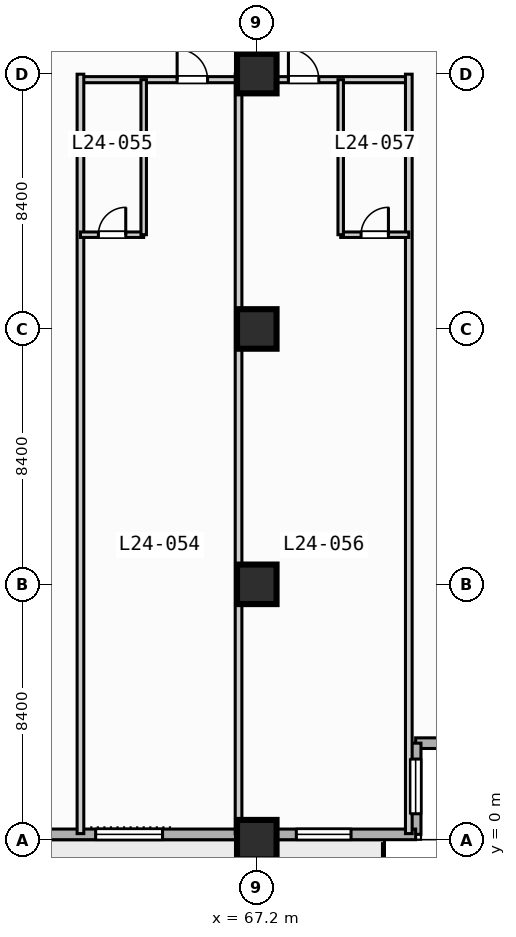
"""IFC4 building model, lengths in metres.
Left out: names, types, materials, properties, quantities, classifications, styles, units other than length and angle.
Written with IfcOpenShell. Run it as: python <this file> out.ifc"""

import sys

from ifc_helpers import new_model, si_unit, direction, frame, frame_2d, origin, origin_2d, place, context, subcontext, project, spatial, rectangle, extrude, element, fill, save


model = new_model("IFC4")
c1 = context("Model", 3, precision=1e-05, world=origin(), true_north=direction((0.0, 1.0)))
c2 = subcontext(c1, "Body", "Model", "MODEL_VIEW")
j1 = project(units=[si_unit("LENGTHUNIT", "METRE"), si_unit("PLANEANGLEUNIT", "RADIAN")], contexts=[c1])
p1 = place(None, origin())
s1 = spatial("IfcSite", under=j1, at=p1, CompositionType="ELEMENT")
p2 = place(p1, origin())
s2 = spatial("IfcBuilding", under=s1, at=p2, CompositionType="ELEMENT")
p3 = place(p2, frame((0.0, 0.0, 103.8)))
s3 = spatial("IfcBuildingStorey", under=s2, at=p3, CompositionType="ELEMENT", Elevation=103.8)
for number, where, z_axis, x_axis in (
    (1, (67.2, 0.0, 0.0), (0.0, 0.0, 1.0), (1.0, 0.0, 0.0)),
    (2, (67.2, 8.4, 0.0), (0.0, 0.0, 1.0), (1.0, 0.0, 0.0)),
    (3, (67.2, 16.8, 0.0), (0.0, 0.0, 1.0), (1.0, 0.0, 0.0)),
    (4, (67.2, 25.2, 0.0), (0.0, 0.0, 1.0), (1.0, 0.0, 0.0)),
):
    element("IfcColumn", number, at=place(p3, frame(where, z_axis=z_axis, x_axis=x_axis)), inside=s3, PredefinedType="COLUMN", context=c2, shape_type="SweptSolid", body=[
        extrude(rectangle(XDim=1.3, YDim=1.3, at=origin_2d()), origin(), (0.0, 0.0, 1.0), 3.8),
    ])
p4 = place(p3, frame((75.425, 3.175, 0.0), z_axis=(0.0, 0.0, 1.0), x_axis=(-1.0, 0.0, 0.0)))
e5 = element("IfcWall", 5, at=p4, inside=s3, PredefinedType="STANDARD", context=c2, shape_type="SweptSolid", body=[
    extrude(rectangle(XDim=3.0, YDim=0.35, at=frame_2d((1.5, 0.0))), origin(), (0.0, 0.0, 1.0), 3.55),
])
p5 = place(p3, frame((72.425, 3.175, 0.0), z_axis=(0.0, 0.0, 1.0), x_axis=(0.0, -1.0, 0.0)))
e6 = element("IfcWall", 6, at=p5, inside=s3, PredefinedType="STANDARD", context=c2, shape_type="SweptSolid", body=[
    extrude(rectangle(XDim=3.0, YDim=0.35, at=frame_2d((1.5, 0.0))), origin(), (0.0, 0.0, 1.0), 3.55),
])
p6 = place(p5, frame((0.522, 0.0, 0.85)))
e7 = element("IfcOpeningElement", 7, at=p6, cuts=e6, PredefinedType="OPENING", context=c2, shape_type="SweptSolid", body=[
    extrude(rectangle(XDim=1.8, YDim=1.8, at=frame_2d((0.9, 0.9))), frame((0.0, 0.185, 0.0), z_axis=(0.0, -1.0, 0.0), x_axis=(1.0, 0.0, 0.0)), (0.0, 0.0, 1.0), 0.37),
])
p7 = place(p3, frame((72.425, 0.175, 0.0), z_axis=(0.0, 0.0, 1.0), x_axis=(-1.0, 0.0, 0.0)))
e8 = element("IfcWall", 8, at=p7, inside=s3, PredefinedType="STANDARD", context=c2, shape_type="SweptSolid", body=[
    extrude(rectangle(XDim=69.25, YDim=0.35, at=frame_2d((34.625, 0.0))), origin(), (0.0, 0.0, 1.0), 3.55),
])
p8 = place(p7, frame((50.225, 0.0, 0.0)))
e9 = element("IfcOpeningElement", 9, at=p8, cuts=e8, PredefinedType="OPENING", context=c2, shape_type="SweptSolid", body=[
    extrude(rectangle(XDim=1.4, YDim=2.2, at=frame_2d((0.7, 1.1))), frame((0.0, 0.185, 0.0), z_axis=(0.0, -1.0, 0.0), x_axis=(1.0, 0.0, 0.0)), (0.0, 0.0, 1.0), 0.37),
])
p9 = place(p7, frame((33.525, 0.0, 0.85)))
e10 = element("IfcOpeningElement", 10, at=p9, cuts=e8, PredefinedType="OPENING", context=c2, shape_type="SweptSolid", body=[
    extrude(rectangle(XDim=2.2, YDim=1.8, at=frame_2d((1.1, 0.9))), frame((0.0, 0.185, 0.0), z_axis=(0.0, -1.0, 0.0), x_axis=(1.0, 0.0, 0.0)), (0.0, 0.0, 1.0), 0.37),
])
p10 = place(p7, frame((25.125, 0.0, 0.85)))
e11 = element("IfcOpeningElement", 11, at=p10, cuts=e8, PredefinedType="OPENING", context=c2, shape_type="SweptSolid", body=[
    extrude(rectangle(XDim=2.2, YDim=1.8, at=frame_2d((1.1, 0.9))), frame((0.0, 0.185, 0.0), z_axis=(0.0, -1.0, 0.0), x_axis=(1.0, 0.0, 0.0)), (0.0, 0.0, 1.0), 0.37),
])
p11 = place(p7, frame((8.325, 0.0, 0.85)))
e12 = element("IfcOpeningElement", 12, at=p11, cuts=e8, PredefinedType="OPENING", context=c2, shape_type="SweptSolid", body=[
    extrude(rectangle(XDim=2.2, YDim=1.8, at=frame_2d((1.1, 0.9))), frame((0.0, 0.185, 0.0), z_axis=(0.0, -1.0, 0.0), x_axis=(1.0, 0.0, 0.0)), (0.0, 0.0, 1.0), 0.37),
])
p12 = place(p7, frame((64.925, 0.0, 0.85)))
e13 = element("IfcOpeningElement", 13, at=p12, cuts=e8, PredefinedType="OPENING", context=c2, shape_type="SweptSolid", body=[
    extrude(rectangle(XDim=1.8, YDim=1.8, at=frame_2d((0.9, 0.9))), frame((0.0, 0.185, 0.0), z_axis=(0.0, -1.0, 0.0), x_axis=(1.0, 0.0, 0.0)), (0.0, 0.0, 1.0), 0.37),
])
p13 = place(p7, frame((56.525, 0.0, 0.85)))
e14 = element("IfcOpeningElement", 14, at=p13, cuts=e8, PredefinedType="OPENING", context=c2, shape_type="SweptSolid", body=[
    extrude(rectangle(XDim=1.8, YDim=1.8, at=frame_2d((0.9, 0.9))), frame((0.0, 0.185, 0.0), z_axis=(0.0, -1.0, 0.0), x_axis=(1.0, 0.0, 0.0)), (0.0, 0.0, 1.0), 0.37),
])
p14 = place(p7, frame((2.125, 0.0, 0.85)))
e15 = element("IfcOpeningElement", 15, at=p14, cuts=e8, PredefinedType="OPENING", context=c2, shape_type="SweptSolid", body=[
    extrude(rectangle(XDim=1.8, YDim=1.8, at=frame_2d((0.9, 0.9))), frame((0.0, 0.185, 0.0), z_axis=(0.0, -1.0, 0.0), x_axis=(1.0, 0.0, 0.0)), (0.0, 0.0, 1.0), 0.37),
])
p15 = place(p3, frame((61.4, 25.0, 0.0), z_axis=(0.0, 0.0, 1.0), x_axis=(1.0, 0.0, 0.0)))
e16 = element("IfcWall", 16, at=p15, inside=s3, PredefinedType="PARTITIONING", context=c2, shape_type="SweptSolid", body=[
    extrude(rectangle(XDim=10.8, YDim=0.2, at=frame_2d((5.4, 0.0))), origin(), (0.0, 0.0, 1.0), 2.8),
])
p16 = place(p15, frame((3.18, 0.0, 0.0)))
e17 = element("IfcOpeningElement", 17, at=p16, cuts=e16, PredefinedType="OPENING", context=c2, shape_type="SweptSolid", body=[
    extrude(rectangle(XDim=1.0, YDim=2.15, at=frame_2d((0.5, 1.075))), frame((0.0, 0.11, 0.0), z_axis=(0.0, -1.0, 0.0), x_axis=(1.0, 0.0, 0.0)), (0.0, 0.0, 1.0), 0.22),
])
p17 = place(p15, frame((6.84, 0.0, 0.0)))
e18 = element("IfcOpeningElement", 18, at=p17, cuts=e16, PredefinedType="OPENING", context=c2, shape_type="SweptSolid", body=[
    extrude(rectangle(XDim=1.0, YDim=2.15, at=frame_2d((0.5, 1.075))), frame((0.0, 0.11, 0.0), z_axis=(0.0, -1.0, 0.0), x_axis=(1.0, 0.0, 0.0)), (0.0, 0.0, 1.0), 0.22),
])
p18 = place(p3, frame((61.4, 0.2, 0.0), z_axis=(0.0, 0.0, 1.0), x_axis=(0.0, 1.0, 0.0)))
e19 = element("IfcWall", 19, at=p18, inside=s3, PredefinedType="PARTITIONING", context=c2, shape_type="SweptSolid", body=[
    extrude(rectangle(XDim=24.98, YDim=0.22, at=frame_2d((12.49, 0.0))), origin(), (0.0, 0.0, 1.0), 3.55),
])
p19 = place(p3, frame((61.4, 19.9, 0.0), z_axis=(0.0, 0.0, 1.0), x_axis=(1.0, 0.0, 0.0)))
e20 = element("IfcWall", 20, at=p19, inside=s3, PredefinedType="PLUMBINGWALL", context=c2, shape_type="SweptSolid", body=[
    extrude(rectangle(XDim=2.08, YDim=0.18, at=frame_2d((1.04, 0.0))), origin(), (0.0, 0.0, 1.0), 3.55),
])
p20 = place(p19, frame((0.59, 0.0, 0.0)))
e21 = element("IfcOpeningElement", 21, at=p20, cuts=e20, PredefinedType="OPENING", context=c2, shape_type="SweptSolid", body=[
    extrude(rectangle(XDim=0.9, YDim=2.1, at=frame_2d((0.45, 1.05))), frame((0.0, 0.1, 0.0), z_axis=(0.0, -1.0, 0.0), x_axis=(1.0, 0.0, 0.0)), (0.0, 0.0, 1.0), 0.2),
])
p21 = place(p3, frame((63.48, 19.9, 0.0), z_axis=(0.0, 0.0, 1.0), x_axis=(0.0, 1.0, 0.0)))
e22 = element("IfcWall", 22, at=p21, inside=s3, PredefinedType="PLUMBINGWALL", context=c2, shape_type="SweptSolid", body=[
    extrude(rectangle(XDim=5.1, YDim=0.18, at=frame_2d((2.55, 0.0))), origin(), (0.0, 0.0, 1.0), 3.55),
])
for number, where, z_axis, x_axis in (
    (23, (66.6, 0.2, 0.0), (0.0, 0.0, 1.0), (0.0, 1.0, 0.0)),
    (24, (72.2, 0.2, 0.0), (0.0, 0.0, 1.0), (0.0, 1.0, 0.0)),
):
    element("IfcWall", number, at=place(p3, frame(where, z_axis=z_axis, x_axis=x_axis)), inside=s3, PredefinedType="PARTITIONING", context=c2, shape_type="SweptSolid", body=[
        extrude(rectangle(XDim=24.98, YDim=0.22, at=frame_2d((12.49, 0.0))), origin(), (0.0, 0.0, 1.0), 3.55),
    ])
p22 = place(p3, frame((69.96, 19.9, 0.0), z_axis=(0.0, 0.0, 1.0), x_axis=(1.0, 0.0, 0.0)))
e25 = element("IfcWall", 25, at=p22, inside=s3, PredefinedType="PLUMBINGWALL", context=c2, shape_type="SweptSolid", body=[
    extrude(rectangle(XDim=2.24, YDim=0.18, at=frame_2d((1.12, 0.0))), origin(), (0.0, 0.0, 1.0), 3.55),
])
p23 = place(p22, frame((0.67, 0.0, 0.0)))
e26 = element("IfcOpeningElement", 26, at=p23, cuts=e25, PredefinedType="OPENING", context=c2, shape_type="SweptSolid", body=[
    extrude(rectangle(XDim=0.9, YDim=2.1, at=frame_2d((0.45, 1.05))), frame((0.0, 0.1, 0.0), z_axis=(0.0, -1.0, 0.0), x_axis=(1.0, 0.0, 0.0)), (0.0, 0.0, 1.0), 0.2),
])
p24 = place(p3, frame((69.96, 19.9, 0.0), z_axis=(0.0, 0.0, 1.0), x_axis=(0.0, 1.0, 0.0)))
e27 = element("IfcWall", 27, at=p24, inside=s3, PredefinedType="PLUMBINGWALL", context=c2, shape_type="SweptSolid", body=[
    extrude(rectangle(XDim=5.1, YDim=0.18, at=frame_2d((2.55, 0.0))), origin(), (0.0, 0.0, 1.0), 3.55),
])
p25 = place(p6, origin())
e28 = element("IfcWindow", 28, at=p25, inside=s3, PartitioningType="SINGLE_PANEL", PredefinedType="WINDOW", context=c2, shape_type="SweptSolid", body=[
    extrude(rectangle(XDim=1.8, YDim=1.8, at=frame_2d((0.9, 0.9))), frame((0.0, 0.03, 0.0), z_axis=(0.0, -1.0, 0.0), x_axis=(1.0, 0.0, 0.0)), (0.0, 0.0, 1.0), 0.06),
])
fill(e7, e28)
p26 = place(p11, origin())
e29 = element("IfcWindow", 29, at=p26, inside=s3, PartitioningType="SINGLE_PANEL", PredefinedType="WINDOW", context=c2, shape_type="SweptSolid", body=[
    extrude(rectangle(XDim=2.2, YDim=1.8, at=frame_2d((1.1, 0.9))), frame((0.0, 0.03, 0.0), z_axis=(0.0, -1.0, 0.0), x_axis=(1.0, 0.0, 0.0)), (0.0, 0.0, 1.0), 0.06),
])
fill(e12, e29)
p27 = place(p14, origin())
e30 = element("IfcWindow", 30, at=p27, inside=s3, PartitioningType="SINGLE_PANEL", PredefinedType="WINDOW", context=c2, shape_type="SweptSolid", body=[
    extrude(rectangle(XDim=1.8, YDim=1.8, at=frame_2d((0.9, 0.9))), frame((0.0, 0.03, 0.0), z_axis=(0.0, -1.0, 0.0), x_axis=(1.0, 0.0, 0.0)), (0.0, 0.0, 1.0), 0.06),
])
fill(e15, e30)
p28 = place(p16, origin())
e31 = element("IfcDoor", 31, at=p28, inside=s3, OperationType="SINGLE_SWING_LEFT", PredefinedType="DOOR", context=c2, shape_type="SweptSolid", body=[
    extrude(rectangle(XDim=1.0, YDim=2.15, at=frame_2d((0.5, 1.075))), frame((0.0, 0.025, 0.0), z_axis=(0.0, -1.0, 0.0), x_axis=(1.0, 0.0, 0.0)), (0.0, 0.0, 1.0), 0.05),
])
fill(e17, e31)
p29 = place(p17, origin())
e32 = element("IfcDoor", 32, at=p29, inside=s3, OperationType="SINGLE_SWING_LEFT", PredefinedType="DOOR", context=c2, shape_type="SweptSolid", body=[
    extrude(rectangle(XDim=1.0, YDim=2.15, at=frame_2d((0.5, 1.075))), frame((0.0, 0.025, 0.0), z_axis=(0.0, -1.0, 0.0), x_axis=(1.0, 0.0, 0.0)), (0.0, 0.0, 1.0), 0.05),
])
fill(e18, e32)
p30 = place(p20, origin())
e33 = element("IfcDoor", 33, at=p30, inside=s3, OperationType="SINGLE_SWING_RIGHT", PredefinedType="DOOR", context=c2, shape_type="SweptSolid", body=[
    extrude(rectangle(XDim=0.9, YDim=2.1, at=frame_2d((0.45, 1.05))), frame((0.0, 0.025, 0.0), z_axis=(0.0, -1.0, 0.0), x_axis=(1.0, 0.0, 0.0)), (0.0, 0.0, 1.0), 0.05),
])
fill(e21, e33)
p31 = place(p23, origin())
e34 = element("IfcDoor", 34, at=p31, inside=s3, OperationType="SINGLE_SWING_RIGHT", PredefinedType="DOOR", context=c2, shape_type="SweptSolid", body=[
    extrude(rectangle(XDim=0.9, YDim=2.1, at=frame_2d((0.45, 1.05))), frame((0.0, 0.025, 0.0), z_axis=(0.0, -1.0, 0.0), x_axis=(1.0, 0.0, 0.0)), (0.0, 0.0, 1.0), 0.05),
])
fill(e26, e34)
save(model, sys.argv[1])
